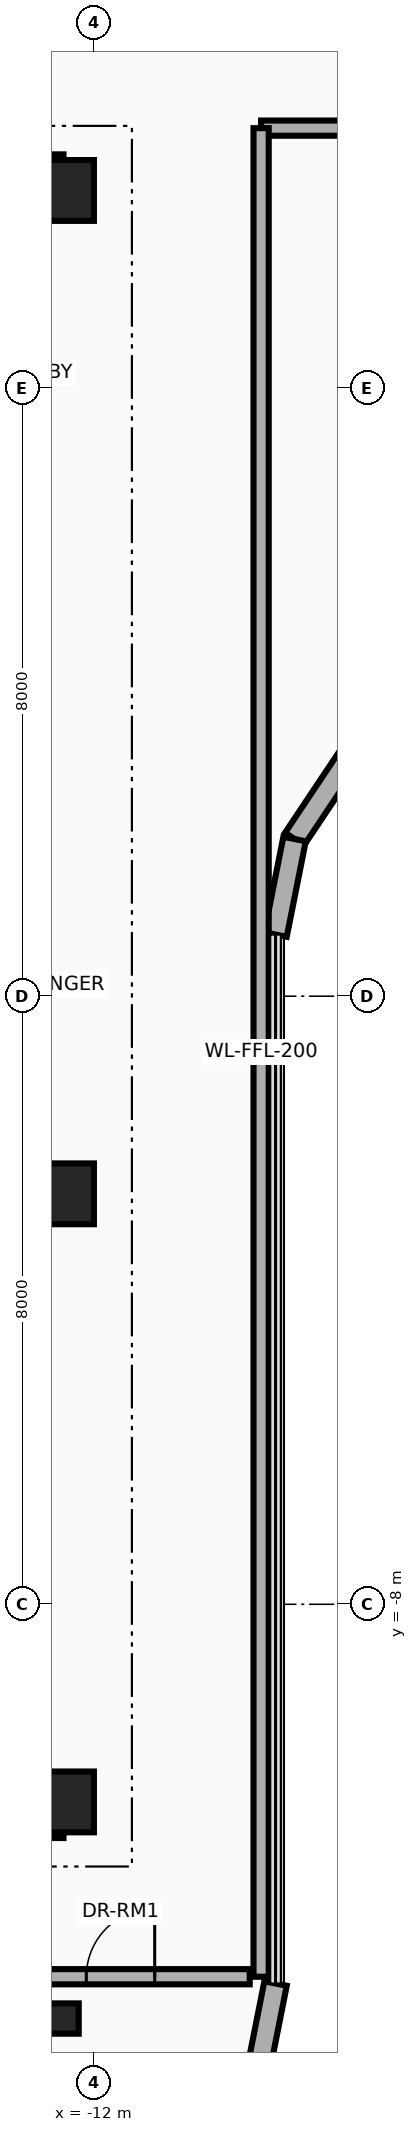
"""IFC4 building model, lengths in metres.
Left out: names, types, materials, properties, quantities, classifications, styles, units other than length and angle.
Written with IfcOpenShell. Run it as: python <this file> out.ifc"""

import sys

from ifc_helpers import new_model, si_unit, direction, frame, frame_2d, origin, origin_2d, place, context, subcontext, project, spatial, rectangle, i_section, extrude, source, transform, mapped, element, fill, save


model = new_model("IFC4")
c1 = context("Model", 3, precision=1e-05, world=origin(), true_north=direction((0.0, 1.0)))
c2 = subcontext(c1, "Body", "Model", "MODEL_VIEW")
j1 = project(units=[si_unit("LENGTHUNIT", "METRE"), si_unit("PLANEANGLEUNIT", "RADIAN")], contexts=[c1])
p1 = place(None, origin())
s1 = spatial("IfcSite", under=j1, at=p1, CompositionType="ELEMENT")
p2 = place(p1, origin())
s2 = spatial("IfcBuilding", under=s1, at=p2, CompositionType="ELEMENT")
p3 = place(p2, frame((0.0, 0.0, 261.5)))
s3 = spatial("IfcBuildingStorey", under=s2, at=p3, CompositionType="ELEMENT", Elevation=261.5)
for number, where, z_axis, x_axis in (
    (1, (-22.65, 10.8, 0.0), (0.0, 0.0, 1.0), (1.0, 0.0, 0.0)),
    (2, (-22.65, -10.8, 0.0), (0.0, 0.0, 1.0), (1.0, 0.0, 0.0)),
):
    element("IfcWall", number, at=place(p3, frame(where, z_axis=z_axis, x_axis=x_axis)), inside=s3, PredefinedType="SHEAR", context=c2, shape_type="SweptSolid", body=[
        extrude(rectangle(XDim=10.25, YDim=0.55, at=frame_2d((5.125, 0.0))), origin(), (0.0, 0.0, 1.0), 4.26),
    ])
m1 = source(origin(), c2, "Body", "SweptSolid", [
    extrude(rectangle(XDim=0.8, YDim=0.8, at=origin_2d()), origin(), (0.0, 0.0, 1.0), 4.5),
])
for number, where, z_axis, x_axis in (
    (3, (-12.4, -10.6, 0.0), (0.0, 0.0, 1.0), (1.0, 0.0, 0.0)),
    (4, (-12.4, -2.6, 0.0), (0.0, 0.0, 1.0), (1.0, 0.0, 0.0)),
    (5, (-12.4, 10.6, 0.0), (0.0, 0.0, 1.0), (1.0, 0.0, 0.0)),
):
    element("IfcColumn", number, at=place(p3, frame(where, z_axis=z_axis, x_axis=x_axis)), inside=s3, PredefinedType="COLUMN", context=c2, shape_type="MappedRepresentation", body=[
        mapped(m1, transform((0.0, 0.0, 0.0), x_axis=(1.0, 0.0, 0.0), y_axis=(0.0, 1.0, 0.0), z_axis=(0.0, 0.0, 1.0), scale=1.0)),
    ])
m2 = source(origin(), c2, "Body", "SweptSolid", [
    extrude(i_section(OverallWidth=0.401, OverallDepth=0.399, WebThickness=0.025, FlangeThickness=0.04, at=origin_2d()), origin(), (0.0, 0.0, 1.0), 4.5),
])
p4 = place(p3, frame((-12.4, -13.45, 0.0), z_axis=(0.0, 0.0, 1.0), x_axis=(1.0, 0.0, 0.0)))
e6 = element("IfcColumn", 6, at=p4, inside=s3, PredefinedType="COLUMN", context=c2, shape_type="MappedRepresentation", body=[
    mapped(m2, transform((0.0, 0.0, 0.0), x_axis=(1.0, 0.0, 0.0), y_axis=(0.0, 1.0, 0.0), z_axis=(0.0, 0.0, 1.0), scale=1.0)),
])
p5 = place(p3, frame((-8.642, 3.142, 0.0), z_axis=(0.0, 0.0, 1.0), x_axis=(-0.555528135371, -0.831497739511, 0.0)))
e7 = element("IfcWall", 7, at=p5, inside=s3, PredefinedType="SOLIDWALL", context=c2, shape_type="SweptSolid", body=[
    extrude(rectangle(XDim=1.292, YDim=0.3, at=frame_2d((0.646, 0.0))), origin(), (0.0, 0.0, 1.0), 4.26),
])
p6 = place(p3, frame((-9.36, 2.067, 0.0), z_axis=(0.0, 0.0, 1.0), x_axis=(-0.195126623715, -0.980778058848, 0.0)))
e8 = element("IfcWall", 8, at=p6, inside=s3, PredefinedType="SOLIDWALL", context=c2, shape_type="SweptSolid", body=[
    extrude(rectangle(XDim=1.281, YDim=0.3, at=frame_2d((0.641, 0.0))), origin(), (0.0, 0.0, 1.0), 4.26),
])
p7 = place(p3, frame((-9.61, -12.989, 0.0), z_axis=(0.0, 0.0, 1.0), x_axis=(-0.194996050505, -0.980804027463, 0.0)))
e9 = element("IfcWall", 9, at=p7, inside=s3, PredefinedType="SOLIDWALL", context=c2, shape_type="SweptSolid", body=[
    extrude(rectangle(XDim=1.216, YDim=0.3, at=frame_2d((0.608, 0.0))), origin(), (0.0, 0.0, 1.0), 4.26),
])
p8 = place(p3, frame((-22.0, -12.9, 0.0), z_axis=(0.0, 0.0, 1.0), x_axis=(1.0, 0.0, 0.0)))
e10 = element("IfcWall", 10, at=p8, inside=s3, PredefinedType="PARTITIONING", context=c2, shape_type="SweptSolid", body=[
    extrude(rectangle(XDim=12.05, YDim=0.2, at=frame_2d((6.025, 0.0))), origin(), (0.0, 0.0, 1.0), 3.634),
])
p9 = place(p8, frame((1.4, 0.0, 0.0)))
e11 = element("IfcOpeningElement", 11, at=p9, cuts=e10, PredefinedType="OPENING", context=c2, shape_type="SweptSolid", body=[
    extrude(rectangle(XDim=0.9, YDim=2.1, at=frame_2d((0.45, 1.05))), frame((0.0, 0.115, 0.0), z_axis=(0.0, -1.0, 0.0), x_axis=(1.0, 0.0, 0.0)), (0.0, 0.0, 1.0), 0.23),
])
p10 = place(p8, frame((5.4, 0.0, 0.0)))
e12 = element("IfcOpeningElement", 12, at=p10, cuts=e10, PredefinedType="OPENING", context=c2, shape_type="SweptSolid", body=[
    extrude(rectangle(XDim=0.9, YDim=2.1, at=frame_2d((0.45, 1.05))), frame((0.0, 0.115, 0.0), z_axis=(0.0, -1.0, 0.0), x_axis=(1.0, 0.0, 0.0)), (0.0, 0.0, 1.0), 0.23),
])
p11 = place(p8, frame((9.9, 0.0, 0.0)))
e13 = element("IfcOpeningElement", 13, at=p11, cuts=e10, PredefinedType="OPENING", context=c2, shape_type="SweptSolid", body=[
    extrude(rectangle(XDim=0.9, YDim=2.1, at=frame_2d((0.45, 1.05))), frame((0.0, 0.115, 0.0), z_axis=(0.0, -1.0, 0.0), x_axis=(1.0, 0.0, 0.0)), (0.0, 0.0, 1.0), 0.23),
])
p12 = place(p3, frame((-9.8, 11.42, 0.0), z_axis=(0.0, 0.0, 1.0), x_axis=(1.0, 0.0, 0.0)))
e14 = element("IfcWall", 14, at=p12, inside=s3, PredefinedType="PARTITIONING", context=c2, shape_type="SweptSolid", body=[
    extrude(rectangle(XDim=8.85, YDim=0.2, at=frame_2d((4.425, 0.0))), origin(), (0.0, 0.0, 1.0), 4.26),
])
p13 = place(p3, frame((-9.8, -12.9, 0.0), z_axis=(0.0, 0.0, 1.0), x_axis=(0.0, 1.0, 0.0)))
e15 = element("IfcWall", 15, at=p13, inside=s3, PredefinedType="PARTITIONING", context=c2, shape_type="SweptSolid", body=[
    extrude(rectangle(XDim=24.32, YDim=0.2, at=frame_2d((12.16, 0.0))), origin(), (0.0, 0.0, 1.0), 4.26),
])
p14 = place(p11, origin())
e16 = element("IfcDoor", 16, at=p14, inside=s3, OperationType="SINGLE_SWING_RIGHT", PredefinedType="DOOR", context=c2, shape_type="SweptSolid", body=[
    extrude(rectangle(XDim=0.9, YDim=2.1, at=frame_2d((0.45, 1.05))), frame((0.0, 0.025, 0.0), z_axis=(0.0, -1.0, 0.0), x_axis=(1.0, 0.0, 0.0)), (0.0, 0.0, 1.0), 0.05),
])
fill(e13, e16)
save(model, sys.argv[1])
